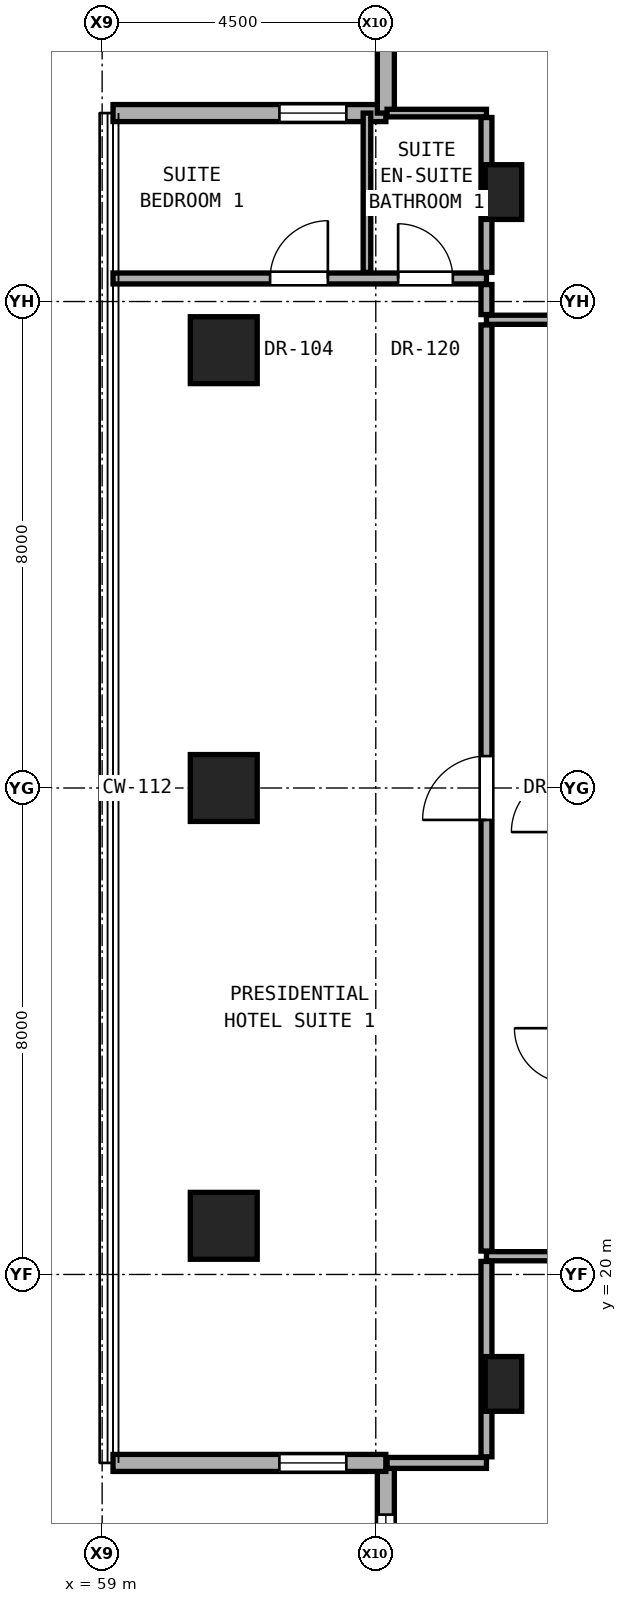
"""IFC4 building model, lengths in metres.
Left out: names, types, materials, properties, quantities, classifications, styles, units other than length and angle.
Written with IfcOpenShell. Run it as: python <this file> out.ifc"""

import sys

from ifc_helpers import new_model, si_unit, direction, frame, frame_2d, origin, origin_2d, place, context, subcontext, project, spatial, rectangle, hollow_rectangle, extrude, element, fill, save


model = new_model("IFC4")
c1 = context("Model", 3, precision=1e-05, world=origin(), true_north=direction((0.0, 1.0)))
c2 = subcontext(c1, "Body", "Model", "MODEL_VIEW")
j1 = project(units=[si_unit("LENGTHUNIT", "METRE"), si_unit("PLANEANGLEUNIT", "RADIAN")], contexts=[c1])
p1 = place(None, origin())
s1 = spatial("IfcSite", under=j1, at=p1, CompositionType="ELEMENT")
p2 = place(p1, origin())
s2 = spatial("IfcBuilding", under=s1, at=p2, CompositionType="ELEMENT")
p3 = place(p2, frame((0.0, 0.0, 124.7)))
s3 = spatial("IfcBuildingStorey", under=s2, at=p3, CompositionType="ELEMENT", Elevation=124.7)
for number, where, z_axis, x_axis in (
    (1, (61.0, 20.8, 0.0), (0.0, 0.0, 1.0), (1.0, 0.0, 0.0)),
    (2, (61.0, 28.0, 0.0), (0.0, 0.0, 1.0), (1.0, 0.0, 0.0)),
    (3, (61.0, 35.2, 0.0), (0.0, 0.0, 1.0), (1.0, 0.0, 0.0)),
):
    element("IfcColumn", number, at=place(p3, frame(where, z_axis=z_axis, x_axis=x_axis)), inside=s3, PredefinedType="COLUMN", context=c2, shape_type="SweptSolid", body=[
        extrude(hollow_rectangle(XDim=1.1, YDim=1.1, WallThickness=0.06, at=origin_2d()), origin(), (0.0, 0.0, 1.0), 3.3),
    ])
for number, where, z_axis, x_axis in (
    (4, (65.6, 18.2, 0.0), (0.0, 0.0, 1.0), (1.0, 0.0, 0.0)),
    (5, (65.6, 37.8, 0.0), (0.0, 0.0, 1.0), (1.0, 0.0, 0.0)),
):
    element("IfcColumn", number, at=place(p3, frame(where, z_axis=z_axis, x_axis=x_axis)), inside=s3, PredefinedType="PILASTER", context=c2, shape_type="SweptSolid", body=[
        extrude(rectangle(XDim=0.6, YDim=0.9, at=origin_2d()), origin(), (0.0, 0.0, 1.0), 3.3),
    ])
p4 = place(p3, frame((63.666, 16.901, 0.0), z_axis=(0.0, 0.0, 1.0), x_axis=(0.0, -1.0, 0.0)))
e6 = element("IfcWall", 6, at=p4, inside=s3, PredefinedType="SOLIDWALL", context=c2, shape_type="SweptSolid", body=[
    extrude(rectangle(XDim=4.487, YDim=0.28, at=frame_2d((2.243, 0.0))), origin(), (0.0, 0.0, 1.0), 3.06),
])
p5 = place(p4, frame((0.85, 0.0, 0.81)))
e7 = element("IfcOpeningElement", 7, at=p5, cuts=e6, PredefinedType="OPENING", context=c2, shape_type="SweptSolid", body=[
    extrude(rectangle(XDim=1.2, YDim=2.1, at=frame_2d((0.6, 1.05))), frame((0.0, 0.15, 0.0), z_axis=(0.0, -1.0, 0.0), x_axis=(1.0, 0.0, 0.0)), (0.0, 0.0, 1.0), 0.3),
])
p6 = place(p3, frame((59.179, 16.901, 0.0), z_axis=(0.0, 0.0, 1.0), x_axis=(1.0, 0.0, 0.0)))
e8 = element("IfcWall", 8, at=p6, inside=s3, PredefinedType="SOLIDWALL", context=c2, shape_type="SweptSolid", body=[
    extrude(rectangle(XDim=4.487, YDim=0.28, at=frame_2d((2.243, 0.0))), origin(), (0.0, 0.0, 1.0), 3.06),
])
p7 = place(p6, frame((2.736, 0.0, 0.85)))
e9 = element("IfcOpeningElement", 9, at=p7, cuts=e8, PredefinedType="OPENING", context=c2, shape_type="SweptSolid", body=[
    extrude(rectangle(XDim=1.1, YDim=2.0, at=frame_2d((0.55, 1.0))), frame((0.0, 0.15, 0.0), z_axis=(0.0, -1.0, 0.0), x_axis=(1.0, 0.0, 0.0)), (0.0, 0.0, 1.0), 0.3),
])
p8 = place(p3, frame((63.666, 39.099, 0.0), z_axis=(0.0, 0.0, 1.0), x_axis=(-1.0, 0.0, 0.0)))
e10 = element("IfcWall", 10, at=p8, inside=s3, PredefinedType="SOLIDWALL", context=c2, shape_type="SweptSolid", body=[
    extrude(rectangle(XDim=4.487, YDim=0.28, at=frame_2d((2.243, 0.0))), origin(), (0.0, 0.0, 1.0), 3.06),
])
p9 = place(p8, frame((0.65, 0.0, 0.85)))
e11 = element("IfcOpeningElement", 11, at=p9, cuts=e10, PredefinedType="OPENING", context=c2, shape_type="SweptSolid", body=[
    extrude(rectangle(XDim=1.1, YDim=2.0, at=frame_2d((0.55, 1.0))), frame((0.0, 0.15, 0.0), z_axis=(0.0, -1.0, 0.0), x_axis=(1.0, 0.0, 0.0)), (0.0, 0.0, 1.0), 0.3),
])
p10 = place(p3, frame((63.666, 43.586, 0.0), z_axis=(0.0, 0.0, 1.0), x_axis=(0.0, -1.0, 0.0)))
e12 = element("IfcWall", 12, at=p10, inside=s3, PredefinedType="SOLIDWALL", context=c2, shape_type="SweptSolid", body=[
    extrude(rectangle(XDim=4.487, YDim=0.28, at=frame_2d((2.243, 0.0))), origin(), (0.0, 0.0, 1.0), 3.06),
])
p11 = place(p3, frame((63.686, 16.901, 0.0), z_axis=(0.0, 0.0, 1.0), x_axis=(1.0, 0.0, 0.0)))
e13 = element("IfcWall", 13, at=p11, inside=s3, PredefinedType="PARTITIONING", context=c2, shape_type="SweptSolid", body=[
    extrude(rectangle(XDim=1.635, YDim=0.18, at=frame_2d((0.817, 0.0))), origin(), (0.0, 0.0, 1.0), 3.08),
])
for number, where, z_axis, x_axis in (
    (14, (65.32, 20.3, 0.0), (0.0, 0.0, 1.0), (1.0, 0.0, 0.0)),
    (15, (65.32, 35.7, 0.0), (0.0, 0.0, 1.0), (1.0, 0.0, 0.0)),
):
    element("IfcWall", number, at=place(p3, frame(where, z_axis=z_axis, x_axis=x_axis)), inside=s3, PredefinedType="PARTITIONING", context=c2, shape_type="SweptSolid", body=[
        extrude(rectangle(XDim=1.36, YDim=0.15, at=frame_2d((0.68, 0.0))), origin(), (0.0, 0.0, 1.0), 3.08),
    ])
p12 = place(p3, frame((59.179, 36.379, 0.0), z_axis=(0.0, 0.0, 1.0), x_axis=(1.0, 0.0, 0.0)))
e16 = element("IfcWall", 16, at=p12, inside=s3, PredefinedType="PARTITIONING", context=c2, shape_type="SweptSolid", body=[
    extrude(rectangle(XDim=6.141, YDim=0.18, at=frame_2d((3.071, 0.0))), origin(), (0.0, 0.0, 1.0), 2.523),
])
p13 = place(p12, frame((2.583, 0.0, 0.0)))
e17 = element("IfcOpeningElement", 17, at=p13, cuts=e16, PredefinedType="OPENING", context=c2, shape_type="SweptSolid", body=[
    extrude(rectangle(XDim=0.95, YDim=2.15, at=frame_2d((0.475, 1.075))), frame((0.0, 0.1, 0.0), z_axis=(0.0, -1.0, 0.0), x_axis=(1.0, 0.0, 0.0)), (0.0, 0.0, 1.0), 0.2),
])
p14 = place(p12, frame((4.688, 0.0, 0.0)))
e18 = element("IfcOpeningElement", 18, at=p14, cuts=e16, PredefinedType="OPENING", context=c2, shape_type="SweptSolid", body=[
    extrude(rectangle(XDim=0.9, YDim=2.1, at=frame_2d((0.45, 1.05))), frame((0.0, 0.1, 0.0), z_axis=(0.0, -1.0, 0.0), x_axis=(1.0, 0.0, 0.0)), (0.0, 0.0, 1.0), 0.2),
])
p15 = place(p3, frame((63.686, 39.099, 0.0), z_axis=(0.0, 0.0, 1.0), x_axis=(1.0, 0.0, 0.0)))
e19 = element("IfcWall", 19, at=p15, inside=s3, PredefinedType="PARTITIONING", context=c2, shape_type="SweptSolid", body=[
    extrude(rectangle(XDim=1.635, YDim=0.125, at=frame_2d((0.817, 0.0))), origin(), (0.0, 0.0, 1.0), 3.08),
])
p16 = place(p3, frame((63.355, 36.479, 0.0), z_axis=(0.0, 0.0, 1.0), x_axis=(0.0, 1.0, 0.0)))
e20 = element("IfcWall", 20, at=p16, inside=s3, PredefinedType="PARTITIONING", context=c2, shape_type="SweptSolid", body=[
    extrude(rectangle(XDim=2.62, YDim=0.125, at=frame_2d((1.31, 0.0))), origin(), (0.0, 0.0, 1.0), 2.523),
])
p17 = place(p3, frame((65.32, 17.001, 0.0), z_axis=(0.0, 0.0, 1.0), x_axis=(0.0, 1.0, 0.0)))
e21 = element("IfcWall", 21, at=p17, inside=s3, PredefinedType="PARTITIONING", context=c2, shape_type="SweptSolid", body=[
    extrude(rectangle(XDim=3.214, YDim=0.18, at=frame_2d((1.607, 0.0))), origin(), (0.0, 0.0, 1.0), 2.523),
])
p18 = place(p3, frame((65.32, 20.385, 0.0), z_axis=(0.0, 0.0, 1.0), x_axis=(0.0, 1.0, 0.0)))
e22 = element("IfcWall", 22, at=p18, inside=s3, PredefinedType="PARTITIONING", context=c2, shape_type="SweptSolid", body=[
    extrude(rectangle(XDim=15.23, YDim=0.18, at=frame_2d((7.615, 0.0))), origin(), (0.0, 0.0, 1.0), 2.376),
])
p19 = place(p18, frame((7.09, 0.0, 0.0)))
e23 = element("IfcOpeningElement", 23, at=p19, cuts=e22, PredefinedType="OPENING", context=c2, shape_type="SweptSolid", body=[
    extrude(rectangle(XDim=1.05, YDim=2.2, at=frame_2d((0.525, 1.1))), frame((0.0, 0.1, 0.0), z_axis=(0.0, -1.0, 0.0), x_axis=(1.0, 0.0, 0.0)), (0.0, 0.0, 1.0), 0.2),
])
p20 = place(p3, frame((65.32, 35.785, 0.0), z_axis=(0.0, 0.0, 1.0), x_axis=(0.0, 1.0, 0.0)))
e24 = element("IfcWall", 24, at=p20, inside=s3, PredefinedType="PARTITIONING", context=c2, shape_type="SweptSolid", body=[
    extrude(rectangle(XDim=0.494, YDim=0.18, at=frame_2d((0.247, 0.0))), origin(), (0.0, 0.0, 1.0), 3.08),
])
p21 = place(p3, frame((65.32, 36.479, 0.0), z_axis=(0.0, 0.0, 1.0), x_axis=(0.0, 1.0, 0.0)))
e25 = element("IfcWall", 25, at=p21, inside=s3, PredefinedType="PARTITIONING", context=c2, shape_type="SweptSolid", body=[
    extrude(rectangle(XDim=2.548, YDim=0.18, at=frame_2d((1.274, 0.0))), origin(), (0.0, 0.0, 1.0), 2.523),
])
p22 = place(p5, origin())
e26 = element("IfcWindow", 26, at=p22, inside=s3, PartitioningType="SINGLE_PANEL", PredefinedType="WINDOW", context=c2, shape_type="SweptSolid", body=[
    extrude(rectangle(XDim=1.2, YDim=2.1, at=frame_2d((0.6, 1.05))), frame((0.0, 0.03, 0.0), z_axis=(0.0, -1.0, 0.0), x_axis=(1.0, 0.0, 0.0)), (0.0, 0.0, 1.0), 0.06),
])
fill(e7, e26)
p23 = place(p7, origin())
e27 = element("IfcWindow", 27, at=p23, inside=s3, PartitioningType="SINGLE_PANEL", PredefinedType="WINDOW", context=c2, shape_type="SweptSolid", body=[
    extrude(rectangle(XDim=1.1, YDim=2.0, at=frame_2d((0.55, 1.0))), frame((0.0, 0.03, 0.0), z_axis=(0.0, -1.0, 0.0), x_axis=(1.0, 0.0, 0.0)), (0.0, 0.0, 1.0), 0.06),
])
fill(e9, e27)
p24 = place(p9, origin())
e28 = element("IfcWindow", 28, at=p24, inside=s3, PartitioningType="SINGLE_PANEL", PredefinedType="WINDOW", context=c2, shape_type="SweptSolid", body=[
    extrude(rectangle(XDim=1.1, YDim=2.0, at=frame_2d((0.55, 1.0))), frame((0.0, 0.03, 0.0), z_axis=(0.0, -1.0, 0.0), x_axis=(1.0, 0.0, 0.0)), (0.0, 0.0, 1.0), 0.06),
])
fill(e11, e28)
p25 = place(p19, origin())
e29 = element("IfcDoor", 29, at=p25, inside=s3, OperationType="SINGLE_SWING_LEFT", PredefinedType="DOOR", context=c2, shape_type="SweptSolid", body=[
    extrude(rectangle(XDim=1.05, YDim=2.2, at=frame_2d((0.525, 1.1))), frame((0.0, 0.025, 0.0), z_axis=(0.0, -1.0, 0.0), x_axis=(1.0, 0.0, 0.0)), (0.0, 0.0, 1.0), 0.05),
])
fill(e23, e29)
p26 = place(p13, origin())
e30 = element("IfcDoor", 30, at=p26, inside=s3, OperationType="SINGLE_SWING_RIGHT", PredefinedType="DOOR", context=c2, shape_type="SweptSolid", body=[
    extrude(rectangle(XDim=0.95, YDim=2.15, at=frame_2d((0.475, 1.075))), frame((0.0, 0.025, 0.0), z_axis=(0.0, -1.0, 0.0), x_axis=(1.0, 0.0, 0.0)), (0.0, 0.0, 1.0), 0.05),
])
fill(e17, e30)
p27 = place(p14, origin())
e31 = element("IfcDoor", 31, at=p27, inside=s3, OperationType="SINGLE_SWING_LEFT", PredefinedType="DOOR", context=c2, shape_type="SweptSolid", body=[
    extrude(rectangle(XDim=0.9, YDim=2.1, at=frame_2d((0.45, 1.05))), frame((0.0, 0.025, 0.0), z_axis=(0.0, -1.0, 0.0), x_axis=(1.0, 0.0, 0.0)), (0.0, 0.0, 1.0), 0.05),
])
fill(e18, e31)
save(model, sys.argv[1])
